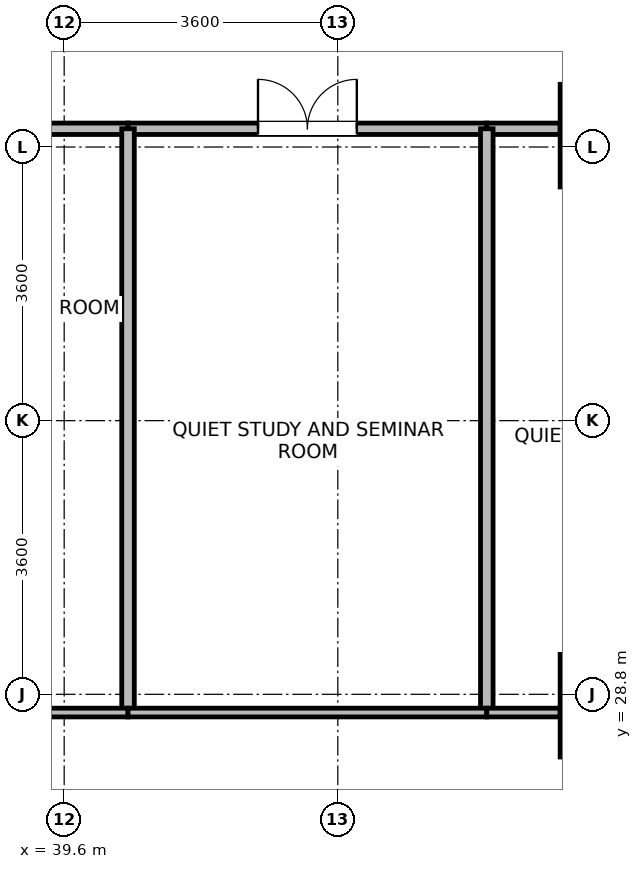
"""IFC4 building model, lengths in metres.
Left out: names, types, materials, properties, quantities, classifications, styles, units other than length and angle.
Written with IfcOpenShell. Run it as: python <this file> out.ifc"""

import sys

from ifc_helpers import new_model, si_unit, direction, frame, frame_2d, origin, origin_2d, place, context, subcontext, project, spatial, rectangle, extrude, source, transform, mapped, element, fill, save


model = new_model("IFC4")
c1 = context("Model", 3, precision=1e-05, world=origin(), true_north=direction((0.0, 1.0)))
c2 = subcontext(c1, "Body", "Model", "MODEL_VIEW")
j1 = project(units=[si_unit("LENGTHUNIT", "METRE"), si_unit("PLANEANGLEUNIT", "RADIAN")], contexts=[c1])
p1 = place(None, origin())
s1 = spatial("IfcSite", under=j1, at=p1, CompositionType="ELEMENT")
p2 = place(p1, origin())
s2 = spatial("IfcBuilding", under=s1, at=p2, CompositionType="ELEMENT")
p3 = place(p2, frame((0.0, 0.0, 40.1)))
s3 = spatial("IfcBuildingStorey", under=s2, at=p3, CompositionType="ELEMENT", Elevation=40.1)
m1 = source(origin(), c2, "Body", "SweptSolid", [
    extrude(rectangle(XDim=1.35, YDim=1.35, at=origin_2d()), origin(), (0.0, 0.0, 1.0), 3.7),
])
for number, where, z_axis, x_axis in (
    (1, (46.8, 28.65, 0.0), (0.0, 0.0, 1.0), (1.0, 0.0, 0.0)),
    (2, (46.8, 36.15, 0.0), (0.0, 0.0, 1.0), (1.0, 0.0, 0.0)),
):
    element("IfcColumn", number, at=place(p3, frame(where, z_axis=z_axis, x_axis=x_axis)), inside=s3, PredefinedType="COLUMN", context=c2, shape_type="MappedRepresentation", body=[
        mapped(m1, transform((0.0, 0.0, 0.0), x_axis=(1.0, 0.0, 0.0), y_axis=(0.0, 1.0, 0.0), z_axis=(0.0, 0.0, 1.0), scale=1.0)),
    ])
p4 = place(p3, frame((36.675, 36.24, 0.0), z_axis=(0.0, 0.0, 1.0), x_axis=(1.0, 0.0, 0.0)))
e3 = element("IfcWall", 3, at=p4, inside=s3, PredefinedType="PARTITIONING", context=c2, shape_type="SweptSolid", body=[
    extrude(rectangle(XDim=3.765, YDim=0.15, at=frame_2d((1.882, 0.0))), origin(), (0.0, 0.0, 1.0), 2.78),
])
p5 = place(p3, frame((40.44, 36.24, 0.0), z_axis=(0.0, 0.0, 1.0), x_axis=(1.0, 0.0, 0.0)))
e4 = element("IfcWall", 4, at=p5, inside=s3, PredefinedType="PARTITIONING", context=c2, shape_type="SweptSolid", body=[
    extrude(rectangle(XDim=4.72, YDim=0.15, at=frame_2d((2.36, 0.0))), origin(), (0.0, 0.0, 1.0), 2.78),
])
p6 = place(p5, frame((1.71, 0.0, 0.0)))
e5 = element("IfcOpeningElement", 5, at=p6, cuts=e4, PredefinedType="OPENING", context=c2, shape_type="SweptSolid", body=[
    extrude(rectangle(XDim=1.3, YDim=2.12, at=frame_2d((0.65, 1.06))), frame((0.0, 0.085, 0.0), z_axis=(0.0, -1.0, 0.0), x_axis=(1.0, 0.0, 0.0)), (0.0, 0.0, 1.0), 0.17),
])
p7 = place(p3, frame((45.16, 36.24, 0.0), z_axis=(0.0, 0.0, 1.0), x_axis=(1.0, 0.0, 0.0)))
e6 = element("IfcWall", 6, at=p7, inside=s3, PredefinedType="PARTITIONING", context=c2, shape_type="SweptSolid", body=[
    extrude(rectangle(XDim=0.965, YDim=0.15, at=frame_2d((0.482, 0.0))), origin(), (0.0, 0.0, 1.0), 2.78),
])
for number, where, z_axis, x_axis in (
    (7, (40.44, 28.56, 0.0), (0.0, 0.0, 1.0), (0.0, 1.0, 0.0)),
    (8, (45.16, 28.56, 0.0), (0.0, 0.0, 1.0), (0.0, 1.0, 0.0)),
):
    element("IfcWall", number, at=place(p3, frame(where, z_axis=z_axis, x_axis=x_axis)), inside=s3, PredefinedType="PARTITIONING", context=c2, shape_type="SweptSolid", body=[
        extrude(rectangle(XDim=7.68, YDim=0.165, at=frame_2d((3.84, 0.0))), origin(), (0.0, 0.0, 1.0), 3.43),
    ])
p8 = place(p3, frame((36.675, 28.56, 0.0), z_axis=(0.0, 0.0, 1.0), x_axis=(1.0, 0.0, 0.0)))
e9 = element("IfcWall", 9, at=p8, inside=s3, PredefinedType="PARTITIONING", context=c2, shape_type="SweptSolid", body=[
    extrude(rectangle(XDim=3.765, YDim=0.115, at=frame_2d((1.882, 0.0))), origin(), (0.0, 0.0, 1.0), 2.78),
])
p9 = place(p3, frame((40.44, 28.56, 0.0), z_axis=(0.0, 0.0, 1.0), x_axis=(1.0, 0.0, 0.0)))
e10 = element("IfcWall", 10, at=p9, inside=s3, PredefinedType="PARTITIONING", context=c2, shape_type="SweptSolid", body=[
    extrude(rectangle(XDim=4.72, YDim=0.115, at=frame_2d((2.36, 0.0))), origin(), (0.0, 0.0, 1.0), 2.78),
])
p10 = place(p3, frame((45.16, 28.56, 0.0), z_axis=(0.0, 0.0, 1.0), x_axis=(1.0, 0.0, 0.0)))
e11 = element("IfcWall", 11, at=p10, inside=s3, PredefinedType="PARTITIONING", context=c2, shape_type="SweptSolid", body=[
    extrude(rectangle(XDim=0.965, YDim=0.115, at=frame_2d((0.482, 0.0))), origin(), (0.0, 0.0, 1.0), 2.78),
])
p11 = place(p6, origin())
e12 = element("IfcDoor", 12, at=p11, inside=s3, OperationType="DOUBLE_DOOR_SINGLE_SWING", PredefinedType="DOOR", context=c2, shape_type="SweptSolid", body=[
    extrude(rectangle(XDim=1.3, YDim=2.12, at=frame_2d((0.65, 1.06))), frame((0.0, 0.025, 0.0), z_axis=(0.0, -1.0, 0.0), x_axis=(1.0, 0.0, 0.0)), (0.0, 0.0, 1.0), 0.05),
])
fill(e5, e12)
save(model, sys.argv[1])
